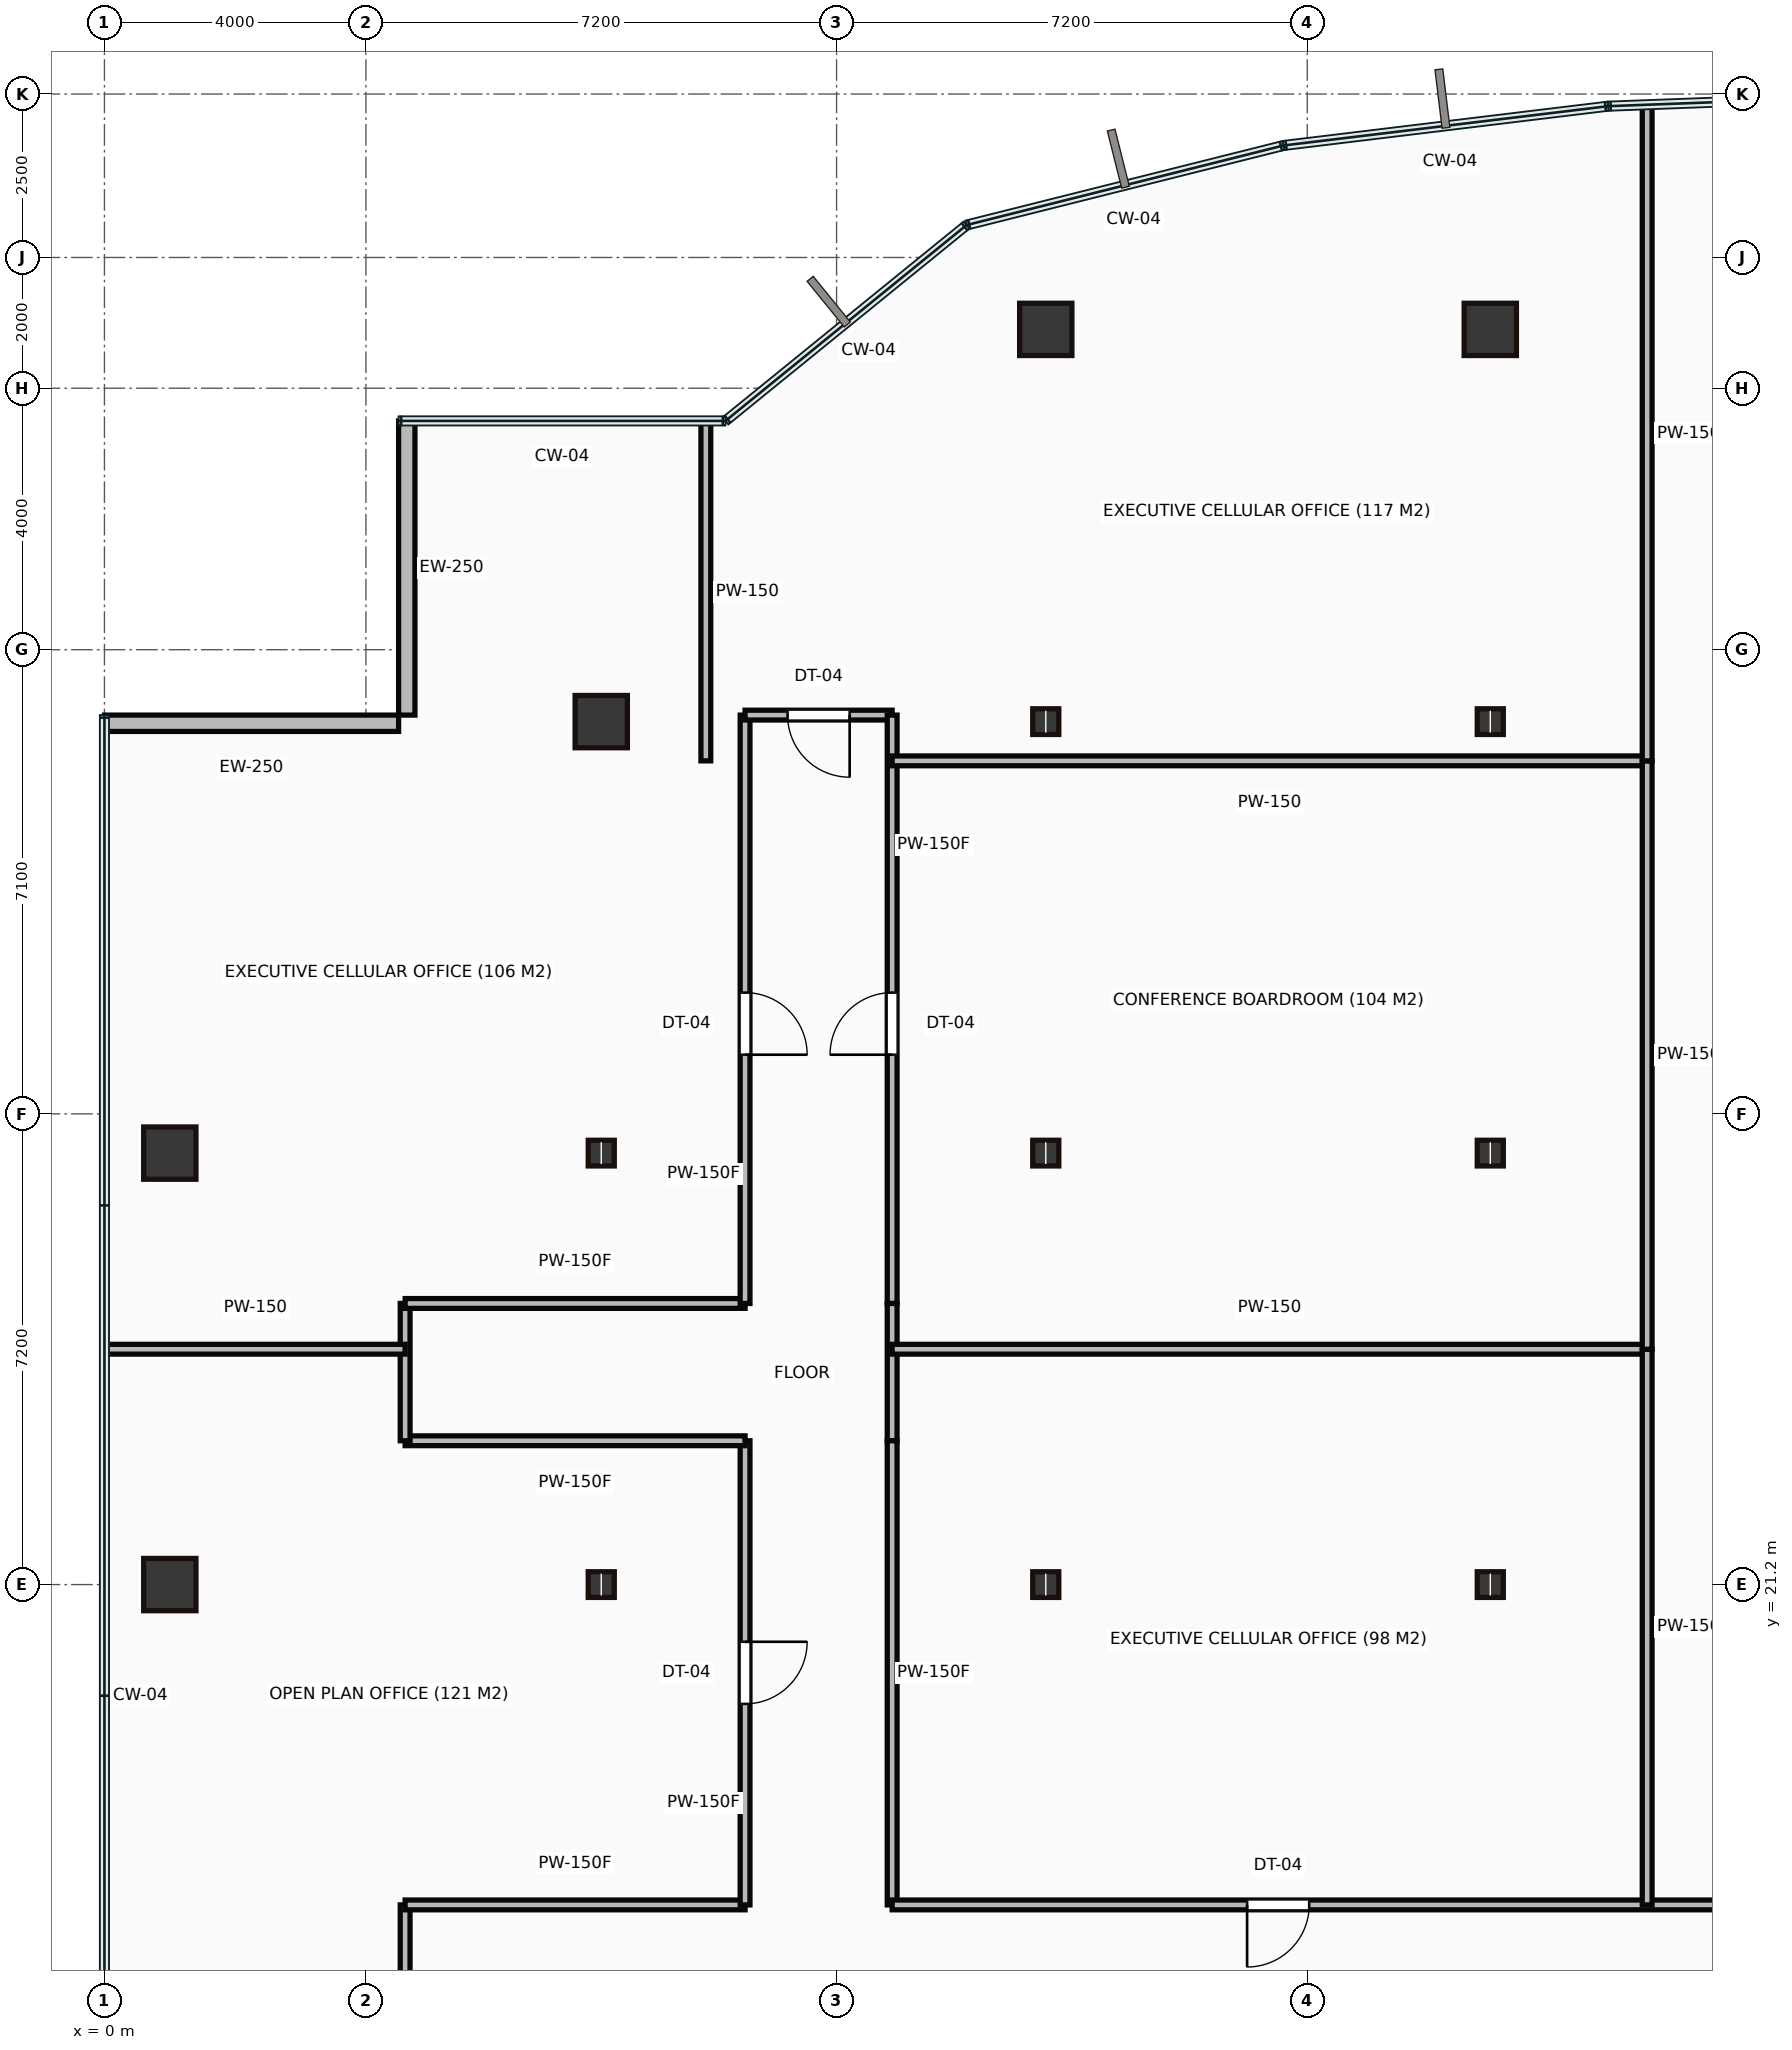
"""IFC4 building model, lengths in metres.
Left out: names, types, materials, properties, quantities, classifications, styles, units other than length and angle.
Written with IfcOpenShell. Run it as: python <this file> out.ifc"""

import sys

from ifc_helpers import new_model, si_unit, direction, frame, frame_2d, origin, origin_2d, place, context, subcontext, project, spatial, rectangle, hollow_rectangle, i_section, extrude, source, transform, mapped, element, fill, save


model = new_model("IFC4")
c1 = context("Model", 3, precision=1e-05, world=origin(), true_north=direction((0.0, 1.0)))
c2 = subcontext(c1, "Body", "Model", "MODEL_VIEW")
j1 = project(units=[si_unit("LENGTHUNIT", "METRE"), si_unit("PLANEANGLEUNIT", "RADIAN")], contexts=[c1])
p1 = place(None, origin())
s1 = spatial("IfcSite", under=j1, at=p1, CompositionType="ELEMENT")
p2 = place(p1, origin())
s2 = spatial("IfcBuilding", under=s1, at=p2, CompositionType="ELEMENT")
p3 = place(p2, frame((0.0, 0.0, 125.15)))
s3 = spatial("IfcBuildingStorey", under=s2, at=p3, CompositionType="ELEMENT", Elevation=125.15)
m1 = source(origin(), c2, "Body", "SweptSolid", [
    extrude(hollow_rectangle(XDim=0.8, YDim=0.8, WallThickness=0.04, at=origin_2d()), origin(), (0.0, 0.0, 1.0), 3.65),
])
for number, where, z_axis, x_axis in (
    (1, (1.0, 21.2, 0.0), (0.0, 0.0, 1.0), (1.0, 0.0, 0.0)),
    (2, (1.0, 27.8, 0.0), (0.0, 0.0, 1.0), (1.0, 0.0, 0.0)),
):
    element("IfcColumn", number, at=place(p3, frame(where, z_axis=z_axis, x_axis=x_axis)), inside=s3, PredefinedType="COLUMN", context=c2, shape_type="MappedRepresentation", body=[
        mapped(m1, transform((0.0, 0.0, 0.0))),
    ])
m2 = source(origin(), c2, "Body", "SweptSolid", [
    extrude(i_section(OverallWidth=0.399, OverallDepth=0.393, WebThickness=0.023, FlangeThickness=0.037, at=origin_2d()), origin(), (0.0, 0.0, 1.0), 3.65),
])
for number, where, z_axis, x_axis in (
    (3, (7.6, 21.2, 0.0), (0.0, 0.0, 1.0), (1.0, 0.0, 0.0)),
    (4, (7.6, 27.8, 0.0), (0.0, 0.0, 1.0), (1.0, 0.0, 0.0)),
):
    element("IfcColumn", number, at=place(p3, frame(where, z_axis=z_axis, x_axis=x_axis)), inside=s3, PredefinedType="COLUMN", context=c2, shape_type="MappedRepresentation", body=[
        mapped(m2, transform((0.0, 0.0, 0.0))),
    ])
p4 = place(p3, frame((7.6, 34.4, 0.0), z_axis=(0.0, 0.0, 1.0), x_axis=(1.0, 0.0, 0.0)))
e5 = element("IfcColumn", 5, at=p4, inside=s3, PredefinedType="COLUMN", context=c2, shape_type="MappedRepresentation", body=[
    mapped(m1, transform((0.0, 0.0, 0.0))),
])
for number, where, z_axis, x_axis in (
    (6, (14.4, 21.2, 0.0), (0.0, 0.0, 1.0), (1.0, 0.0, 0.0)),
    (7, (14.4, 27.8, 0.0), (0.0, 0.0, 1.0), (1.0, 0.0, 0.0)),
    (8, (14.4, 34.4, 0.0), (0.0, 0.0, 1.0), (1.0, 0.0, 0.0)),
):
    element("IfcColumn", number, at=place(p3, frame(where, z_axis=z_axis, x_axis=x_axis)), inside=s3, PredefinedType="COLUMN", context=c2, shape_type="MappedRepresentation", body=[
        mapped(m2, transform((0.0, 0.0, 0.0))),
    ])
p5 = place(p3, frame((14.4, 40.4, 0.0), z_axis=(0.0, 0.0, 1.0), x_axis=(1.0, 0.0, 0.0)))
e9 = element("IfcColumn", 9, at=p5, inside=s3, PredefinedType="COLUMN", context=c2, shape_type="MappedRepresentation", body=[
    mapped(m1, transform((0.0, 0.0, 0.0))),
])
for number, where, z_axis, x_axis in (
    (10, (21.2, 21.2, 0.0), (0.0, 0.0, 1.0), (1.0, 0.0, 0.0)),
    (11, (21.2, 27.8, 0.0), (0.0, 0.0, 1.0), (1.0, 0.0, 0.0)),
    (12, (21.2, 34.4, 0.0), (0.0, 0.0, 1.0), (1.0, 0.0, 0.0)),
):
    element("IfcColumn", number, at=place(p3, frame(where, z_axis=z_axis, x_axis=x_axis)), inside=s3, PredefinedType="COLUMN", context=c2, shape_type="MappedRepresentation", body=[
        mapped(m2, transform((0.0, 0.0, 0.0))),
    ])
p6 = place(p3, frame((21.2, 40.4, 0.0), z_axis=(0.0, 0.0, 1.0), x_axis=(1.0, 0.0, 0.0)))
e13 = element("IfcColumn", 13, at=p6, inside=s3, PredefinedType="COLUMN", context=c2, shape_type="MappedRepresentation", body=[
    mapped(m1, transform((0.0, 0.0, 0.0))),
])
m3 = source(origin(), c2, "Body", "SweptSolid", [
    extrude(rectangle(XDim=4.5, YDim=0.25, at=frame_2d((2.25, 0.0))), origin(), (0.0, 0.0, 1.0), 3.4),
])
for number, where, z_axis, x_axis in (
    (14, (4.625, 39.0, 0.0), (0.0, 0.0, 1.0), (0.0, -1.0, 0.0)),
    (15, (4.5, 34.375, 0.0), (0.0, 0.0, 1.0), (-1.0, 0.0, 0.0)),
):
    element("IfcWall", number, at=place(p3, frame(where, z_axis=z_axis, x_axis=x_axis)), inside=s3, PredefinedType="STANDARD", context=c2, shape_type="MappedRepresentation", body=[
        mapped(m3, transform((0.0, 0.0, 0.0))),
    ])
m4 = source(origin(), c2, "Body", "SweptSolid", [
    extrude(rectangle(XDim=2.22, YDim=0.15, at=frame_2d((1.11, 0.0))), origin(), (0.0, 0.0, 1.0), 3.4),
])
p7 = place(p3, frame((4.6, 14.08, 0.0), z_axis=(0.0, 0.0, 1.0), x_axis=(0.0, 1.0, 0.0)))
e16 = element("IfcWall", 16, at=p7, inside=s3, PredefinedType="PARTITIONING", context=c2, shape_type="MappedRepresentation", body=[
    mapped(m4, transform((0.0, 0.0, 0.0))),
])
m5 = source(origin(), c2, "Body", "SweptSolid", [
    extrude(rectangle(XDim=5.2, YDim=0.15, at=frame_2d((2.6, 0.0))), origin(), (0.0, 0.0, 1.0), 3.4),
])
p8 = place(p3, frame((4.6, 16.3, 0.0), z_axis=(0.0, 0.0, 1.0), x_axis=(1.0, 0.0, 0.0)))
e17 = element("IfcWall", 17, at=p8, inside=s3, PredefinedType="PARTITIONING", context=c2, shape_type="MappedRepresentation", body=[
    mapped(m5, transform((0.0, 0.0, 0.0))),
])
m6 = source(origin(), c2, "Body", "SweptSolid", [
    extrude(rectangle(XDim=7.1, YDim=0.15, at=frame_2d((3.55, 0.0))), origin(), (0.0, 0.0, 1.0), 3.4),
])
p9 = place(p3, frame((9.8, 16.3, 0.0), z_axis=(0.0, 0.0, 1.0), x_axis=(0.0, 1.0, 0.0)))
e18 = element("IfcWall", 18, at=p9, inside=s3, PredefinedType="PARTITIONING", context=c2, shape_type="MappedRepresentation", body=[
    mapped(m6, transform((0.0, 0.0, 0.0))),
])
p10 = place(p9, frame((3.075, 0.0, 0.0)))
e19 = element("IfcOpeningElement", 19, at=p10, cuts=e18, PredefinedType="OPENING", context=c2, shape_type="SweptSolid", body=[
    extrude(rectangle(XDim=0.95, YDim=2.15, at=frame_2d((0.475, 1.075))), frame((0.0, 0.085, 0.0), z_axis=(0.0, -1.0, 0.0), x_axis=(1.0, 0.0, 0.0)), (0.0, 0.0, 1.0), 0.17),
])
m7 = source(origin(), c2, "Body", "SweptSolid", [
    extrude(rectangle(XDim=5.2, YDim=0.15, at=frame_2d((2.6, 0.0))), origin(), (0.0, 0.0, 1.0), 2.988),
])
p11 = place(p3, frame((9.8, 23.4, 0.0), z_axis=(0.0, 0.0, 1.0), x_axis=(-1.0, 0.0, 0.0)))
e20 = element("IfcWall", 20, at=p11, inside=s3, PredefinedType="PARTITIONING", context=c2, shape_type="MappedRepresentation", body=[
    mapped(m7, transform((0.0, 0.0, 0.0))),
])
m8 = source(origin(), c2, "Body", "SweptSolid", [
    extrude(rectangle(XDim=2.1, YDim=0.15, at=frame_2d((1.05, 0.0))), origin(), (0.0, 0.0, 1.0), 3.4),
])
p12 = place(p3, frame((4.6, 23.4, 0.0), z_axis=(0.0, 0.0, 1.0), x_axis=(0.0, 1.0, 0.0)))
e21 = element("IfcWall", 21, at=p12, inside=s3, PredefinedType="PARTITIONING", context=c2, shape_type="MappedRepresentation", body=[
    mapped(m8, transform((0.0, 0.0, 0.0))),
])
p13 = place(p3, frame((4.6, 25.5, 0.0), z_axis=(0.0, 0.0, 1.0), x_axis=(1.0, 0.0, 0.0)))
e22 = element("IfcWall", 22, at=p13, inside=s3, PredefinedType="PARTITIONING", context=c2, shape_type="MappedRepresentation", body=[
    mapped(m7, transform((0.0, 0.0, 0.0))),
])
m9 = source(origin(), c2, "Body", "SweptSolid", [
    extrude(rectangle(XDim=9.0, YDim=0.15, at=frame_2d((4.5, 0.0))), origin(), (0.0, 0.0, 1.0), 3.4),
])
p14 = place(p3, frame((9.8, 25.5, 0.0), z_axis=(0.0, 0.0, 1.0), x_axis=(0.0, 1.0, 0.0)))
e23 = element("IfcWall", 23, at=p14, inside=s3, PredefinedType="PARTITIONING", context=c2, shape_type="MappedRepresentation", body=[
    mapped(m9, transform((0.0, 0.0, 0.0))),
])
p15 = place(p14, frame((3.805, 0.0, 0.0)))
e24 = element("IfcOpeningElement", 24, at=p15, cuts=e23, PredefinedType="OPENING", context=c2, shape_type="SweptSolid", body=[
    extrude(rectangle(XDim=0.95, YDim=2.15, at=frame_2d((0.475, 1.075))), frame((0.0, 0.085, 0.0), z_axis=(0.0, -1.0, 0.0), x_axis=(1.0, 0.0, 0.0)), (0.0, 0.0, 1.0), 0.17),
])
m10 = source(origin(), c2, "Body", "SweptSolid", [
    extrude(rectangle(XDim=2.25, YDim=0.15, at=frame_2d((1.125, 0.0))), origin(), (0.0, 0.0, 1.0), 2.702),
])
p16 = place(p3, frame((9.8, 34.5, 0.0), z_axis=(0.0, 0.0, 1.0), x_axis=(1.0, 0.0, 0.0)))
e25 = element("IfcWall", 25, at=p16, inside=s3, PredefinedType="PARTITIONING", context=c2, shape_type="MappedRepresentation", body=[
    mapped(m10, transform((0.0, 0.0, 0.0))),
])
p17 = place(p16, frame((0.65, 0.0, 0.0)))
e26 = element("IfcOpeningElement", 26, at=p17, cuts=e25, PredefinedType="OPENING", context=c2, shape_type="SweptSolid", body=[
    extrude(rectangle(XDim=0.95, YDim=2.15, at=frame_2d((0.475, 1.075))), frame((0.0, 0.085, 0.0), z_axis=(0.0, -1.0, 0.0), x_axis=(1.0, 0.0, 0.0)), (0.0, 0.0, 1.0), 0.17),
])
p18 = place(p3, frame((12.05, 34.5, 0.0), z_axis=(0.0, 0.0, 1.0), x_axis=(0.0, -1.0, 0.0)))
e27 = element("IfcWall", 27, at=p18, inside=s3, PredefinedType="PARTITIONING", context=c2, shape_type="MappedRepresentation", body=[
    mapped(m9, transform((0.0, 0.0, 0.0))),
])
p19 = place(p18, frame((4.245, 0.0, 0.0)))
e28 = element("IfcOpeningElement", 28, at=p19, cuts=e27, PredefinedType="OPENING", context=c2, shape_type="SweptSolid", body=[
    extrude(rectangle(XDim=0.95, YDim=2.15, at=frame_2d((0.475, 1.075))), frame((0.0, 0.085, 0.0), z_axis=(0.0, -1.0, 0.0), x_axis=(1.0, 0.0, 0.0)), (0.0, 0.0, 1.0), 0.17),
])
p20 = place(p3, frame((12.05, 25.5, 0.0), z_axis=(0.0, 0.0, 1.0), x_axis=(0.0, -1.0, 0.0)))
e29 = element("IfcWall", 29, at=p20, inside=s3, PredefinedType="PARTITIONING", context=c2, shape_type="MappedRepresentation", body=[
    mapped(m8, transform((0.0, 0.0, 0.0))),
])
p21 = place(p3, frame((12.05, 23.4, 0.0), z_axis=(0.0, 0.0, 1.0), x_axis=(0.0, -1.0, 0.0)))
e30 = element("IfcWall", 30, at=p21, inside=s3, PredefinedType="PARTITIONING", context=c2, shape_type="MappedRepresentation", body=[
    mapped(m6, transform((0.0, 0.0, 0.0))),
])
m11 = source(origin(), c2, "Body", "SweptSolid", [
    extrude(rectangle(XDim=28.75, YDim=0.15, at=frame_2d((14.375, 0.0))), origin(), (0.0, 0.0, 1.0), 3.4),
])
p22 = place(p3, frame((12.05, 16.3, 0.0), z_axis=(0.0, 0.0, 1.0), x_axis=(1.0, 0.0, 0.0)))
e31 = element("IfcWall", 31, at=p22, inside=s3, PredefinedType="PARTITIONING", context=c2, shape_type="MappedRepresentation", body=[
    mapped(m11, transform((0.0, 0.0, 0.0))),
])
p23 = place(p22, frame((5.43, 0.0, 0.0)))
e32 = element("IfcOpeningElement", 32, at=p23, cuts=e31, PredefinedType="OPENING", context=c2, shape_type="SweptSolid", body=[
    extrude(rectangle(XDim=0.95, YDim=2.15, at=frame_2d((0.475, 1.075))), frame((0.0, 0.085, 0.0), z_axis=(0.0, -1.0, 0.0), x_axis=(1.0, 0.0, 0.0)), (0.0, 0.0, 1.0), 0.17),
])
p24 = place(p22, frame((16.675, 0.0, 0.0)))
e33 = element("IfcOpeningElement", 33, at=p24, cuts=e31, PredefinedType="OPENING", context=c2, shape_type="SweptSolid", body=[
    extrude(rectangle(XDim=0.95, YDim=2.15, at=frame_2d((0.475, 1.075))), frame((0.0, 0.085, 0.0), z_axis=(0.0, -1.0, 0.0), x_axis=(1.0, 0.0, 0.0)), (0.0, 0.0, 1.0), 0.17),
])
p25 = place(p22, frame((25.145, 0.0, 0.0)))
e34 = element("IfcOpeningElement", 34, at=p25, cuts=e31, PredefinedType="OPENING", context=c2, shape_type="SweptSolid", body=[
    extrude(rectangle(XDim=0.95, YDim=2.15, at=frame_2d((0.475, 1.075))), frame((0.0, 0.085, 0.0), z_axis=(0.0, -1.0, 0.0), x_axis=(1.0, 0.0, 0.0)), (0.0, 0.0, 1.0), 0.17),
])
m12 = source(origin(), c2, "Body", "SweptSolid", [
    extrude(rectangle(XDim=4.58, YDim=0.15, at=frame_2d((2.29, 0.0))), origin(), (0.0, 0.0, 1.0), 3.4),
])
p26 = place(p3, frame((0.02, 24.8, 0.0), z_axis=(0.0, 0.0, 1.0), x_axis=(1.0, 0.0, 0.0)))
e35 = element("IfcWall", 35, at=p26, inside=s3, PredefinedType="PARTITIONING", context=c2, shape_type="MappedRepresentation", body=[
    mapped(m12, transform((0.0, 0.0, 0.0))),
])
m13 = source(origin(), c2, "Body", "SweptSolid", [
    extrude(rectangle(XDim=5.18, YDim=0.15, at=frame_2d((2.59, 0.0))), origin(), (0.0, 0.0, 1.0), 3.4),
])
p27 = place(p3, frame((9.2, 38.98, 0.0), z_axis=(0.0, 0.0, 1.0), x_axis=(0.0, -1.0, 0.0)))
e36 = element("IfcWall", 36, at=p27, inside=s3, PredefinedType="PARTITIONING", context=c2, shape_type="MappedRepresentation", body=[
    mapped(m13, transform((0.0, 0.0, 0.0))),
])
m14 = source(origin(), c2, "Body", "SweptSolid", [
    extrude(rectangle(XDim=11.55, YDim=0.15, at=frame_2d((5.775, 0.0))), origin(), (0.0, 0.0, 1.0), 3.4),
])
for number, where, z_axis, x_axis in (
    (37, (12.05, 24.8, 0.0), (0.0, 0.0, 1.0), (1.0, 0.0, 0.0)),
    (38, (23.6, 33.8, 0.0), (0.0, 0.0, 1.0), (-1.0, 0.0, 0.0)),
):
    element("IfcWall", number, at=place(p3, frame(where, z_axis=z_axis, x_axis=x_axis)), inside=s3, PredefinedType="PARTITIONING", context=c2, shape_type="MappedRepresentation", body=[
        mapped(m14, transform((0.0, 0.0, 0.0))),
    ])
m15 = source(origin(), c2, "Body", "SweptSolid", [
    extrude(rectangle(XDim=8.5, YDim=0.15, at=frame_2d((4.25, 0.0))), origin(), (0.0, 0.0, 1.0), 3.4),
])
p28 = place(p3, frame((23.6, 24.8, 0.0), z_axis=(0.0, 0.0, 1.0), x_axis=(0.0, -1.0, 0.0)))
e39 = element("IfcWall", 39, at=p28, inside=s3, PredefinedType="PARTITIONING", context=c2, shape_type="MappedRepresentation", body=[
    mapped(m15, transform((0.0, 0.0, 0.0))),
])
p29 = place(p3, frame((23.6, 33.8, 0.0), z_axis=(0.0, 0.0, 1.0), x_axis=(0.0, -1.0, 0.0)))
e40 = element("IfcWall", 40, at=p29, inside=s3, PredefinedType="PARTITIONING", context=c2, shape_type="MappedRepresentation", body=[
    mapped(m9, transform((0.0, 0.0, 0.0))),
])
m16 = source(origin(), c2, "Body", "SweptSolid", [
    extrude(rectangle(XDim=10.016, YDim=0.15, at=frame_2d((5.008, 0.0))), origin(), (0.0, 0.0, 1.0), 3.4),
])
p30 = place(p3, frame((23.6, 43.816, 0.0), z_axis=(0.0, 0.0, 1.0), x_axis=(0.0, -1.0, 0.0)))
e41 = element("IfcWall", 41, at=p30, inside=s3, PredefinedType="PARTITIONING", context=c2, shape_type="MappedRepresentation", body=[
    mapped(m16, transform((0.0, 0.0, 0.0))),
])
m17 = source(origin(), c2, "Body", "SweptSolid", [
    extrude(rectangle(XDim=0.95, YDim=2.15, at=frame_2d((0.475, 1.075))), frame((0.0, 0.025, 0.0), z_axis=(0.0, -1.0, 0.0), x_axis=(1.0, 0.0, 0.0)), (0.0, 0.0, 1.0), 0.05),
])
p31 = place(p10, origin())
e42 = element("IfcDoor", 42, at=p31, inside=s3, OperationType="SINGLE_SWING_RIGHT", PredefinedType="DOOR", context=c2, shape_type="MappedRepresentation", body=[
    mapped(m17, transform((0.0, 0.0, 0.0))),
])
fill(e19, e42)
p32 = place(p15, origin())
e43 = element("IfcDoor", 43, at=p32, inside=s3, OperationType="SINGLE_SWING_LEFT", PredefinedType="DOOR", context=c2, shape_type="MappedRepresentation", body=[
    mapped(m17, transform((0.0, 0.0, 0.0))),
])
fill(e24, e43)
p33 = place(p17, origin())
e44 = element("IfcDoor", 44, at=p33, inside=s3, OperationType="SINGLE_SWING_RIGHT", PredefinedType="DOOR", context=c2, shape_type="MappedRepresentation", body=[
    mapped(m17, transform((0.0, 0.0, 0.0))),
])
fill(e26, e44)
p34 = place(p23, origin())
e45 = element("IfcDoor", 45, at=p34, inside=s3, OperationType="SINGLE_SWING_LEFT", PredefinedType="DOOR", context=c2, shape_type="MappedRepresentation", body=[
    mapped(m17, transform((0.0, 0.0, 0.0))),
])
fill(e32, e45)
p35 = place(p19, origin())
e46 = element("IfcDoor", 46, at=p35, inside=s3, OperationType="SINGLE_SWING_RIGHT", PredefinedType="DOOR", context=c2, shape_type="MappedRepresentation", body=[
    mapped(m17, transform((0.0, 0.0, 0.0))),
])
fill(e28, e46)
save(model, sys.argv[1])
